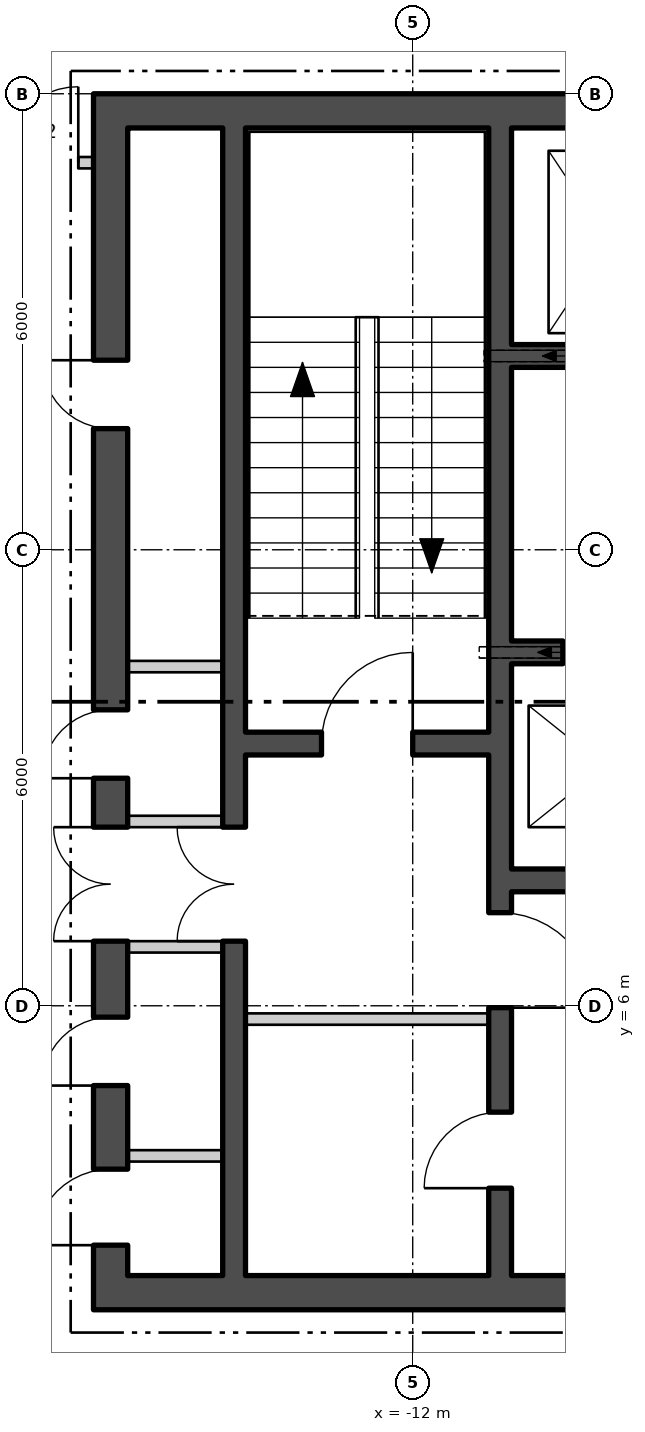
"""IFC4 building model, lengths in metres.
Left out: names, types, materials, properties, quantities, classifications, styles, units other than length and angle.
Written with IfcOpenShell. Run it as: python <this file> out.ifc"""

import sys

from ifc_helpers import new_model, si_unit, direction, frame, frame_2d, origin, place, context, subcontext, project, spatial, polyline, rectangle, outline, extrude, element, fill, save


model = new_model("IFC4")
c1 = context("Model", 3, precision=1e-05, world=origin(), true_north=direction((0.0, 1.0)))
c2 = subcontext(c1, "Body", "Model", "MODEL_VIEW")
j1 = project(units=[si_unit("LENGTHUNIT", "METRE"), si_unit("PLANEANGLEUNIT", "RADIAN")], contexts=[c1])
p1 = place(None, origin())
s1 = spatial("IfcSite", under=j1, at=p1, CompositionType="ELEMENT")
p2 = place(p1, origin())
s2 = spatial("IfcBuilding", under=s1, at=p2, CompositionType="ELEMENT")
p3 = place(p2, frame((0.0, 0.0, 192.6)))
s3 = spatial("IfcBuildingStorey", under=s2, at=p3, CompositionType="ELEMENT", Elevation=192.6)
p4 = place(p3, frame((-26.54, 13.618, -0.18), z_axis=(0.0, 0.0, 1.0), x_axis=(0.499999764979, -0.866025539474, 0.0)))
e1 = element("IfcWall", 1, at=p4, inside=s3, PredefinedType="SOLIDWALL", context=c2, shape_type="SweptSolid", body=[
    extrude(outline(polyline([(-0.13, -0.225), (45.87, -0.225), (45.61, 0.225), (0.13, 0.225), (-0.13, -0.225)])), origin(), (0.0, 0.0, 1.0), 3.68),
])
p5 = place(p4, frame((1.424, 0.0, 1.08)))
e2 = element("IfcOpeningElement", 2, at=p5, cuts=e1, PredefinedType="OPENING", context=c2, shape_type="SweptSolid", body=[
    extrude(rectangle(XDim=2.4, YDim=2.0, at=frame_2d((1.2, 1.0))), frame((0.0, 0.235, 0.0), z_axis=(0.0, -1.0, 0.0), x_axis=(1.0, 0.0, 0.0)), (0.0, 0.0, 1.0), 0.47),
])
p6 = place(p4, frame((5.893, 0.0, 1.08)))
e3 = element("IfcOpeningElement", 3, at=p6, cuts=e1, PredefinedType="OPENING", context=c2, shape_type="SweptSolid", body=[
    extrude(rectangle(XDim=2.4, YDim=2.0, at=frame_2d((1.2, 1.0))), frame((0.0, 0.235, 0.0), z_axis=(0.0, -1.0, 0.0), x_axis=(1.0, 0.0, 0.0)), (0.0, 0.0, 1.0), 0.47),
])
p7 = place(p4, frame((10.401, 0.0, 1.08)))
e4 = element("IfcOpeningElement", 4, at=p7, cuts=e1, PredefinedType="OPENING", context=c2, shape_type="SweptSolid", body=[
    extrude(rectangle(XDim=2.4, YDim=2.0, at=frame_2d((1.2, 1.0))), frame((0.0, 0.235, 0.0), z_axis=(0.0, -1.0, 0.0), x_axis=(1.0, 0.0, 0.0)), (0.0, 0.0, 1.0), 0.47),
])
p8 = place(p4, frame((14.909, 0.0, 1.08)))
e5 = element("IfcOpeningElement", 5, at=p8, cuts=e1, PredefinedType="OPENING", context=c2, shape_type="SweptSolid", body=[
    extrude(rectangle(XDim=2.4, YDim=2.0, at=frame_2d((1.2, 1.0))), frame((0.0, 0.235, 0.0), z_axis=(0.0, -1.0, 0.0), x_axis=(1.0, 0.0, 0.0)), (0.0, 0.0, 1.0), 0.47),
])
p9 = place(p4, frame((19.416, 0.0, 1.08)))
e6 = element("IfcOpeningElement", 6, at=p9, cuts=e1, PredefinedType="OPENING", context=c2, shape_type="SweptSolid", body=[
    extrude(rectangle(XDim=2.4, YDim=2.0, at=frame_2d((1.2, 1.0))), frame((0.0, 0.235, 0.0), z_axis=(0.0, -1.0, 0.0), x_axis=(1.0, 0.0, 0.0)), (0.0, 0.0, 1.0), 0.47),
])
p10 = place(p4, frame((23.924, 0.0, 1.08)))
e7 = element("IfcOpeningElement", 7, at=p10, cuts=e1, PredefinedType="OPENING", context=c2, shape_type="SweptSolid", body=[
    extrude(rectangle(XDim=2.4, YDim=2.0, at=frame_2d((1.2, 1.0))), frame((0.0, 0.235, 0.0), z_axis=(0.0, -1.0, 0.0), x_axis=(1.0, 0.0, 0.0)), (0.0, 0.0, 1.0), 0.47),
])
p11 = place(p4, frame((28.431, 0.0, 1.08)))
e8 = element("IfcOpeningElement", 8, at=p11, cuts=e1, PredefinedType="OPENING", context=c2, shape_type="SweptSolid", body=[
    extrude(rectangle(XDim=2.4, YDim=2.0, at=frame_2d((1.2, 1.0))), frame((0.0, 0.235, 0.0), z_axis=(0.0, -1.0, 0.0), x_axis=(1.0, 0.0, 0.0)), (0.0, 0.0, 1.0), 0.47),
])
p12 = place(p4, frame((32.939, 0.0, 1.08)))
e9 = element("IfcOpeningElement", 9, at=p12, cuts=e1, PredefinedType="OPENING", context=c2, shape_type="SweptSolid", body=[
    extrude(rectangle(XDim=2.4, YDim=2.0, at=frame_2d((1.2, 1.0))), frame((0.0, 0.235, 0.0), z_axis=(0.0, -1.0, 0.0), x_axis=(1.0, 0.0, 0.0)), (0.0, 0.0, 1.0), 0.47),
])
p13 = place(p4, frame((41.916, 0.0, 1.08)))
e10 = element("IfcOpeningElement", 10, at=p13, cuts=e1, PredefinedType="OPENING", context=c2, shape_type="SweptSolid", body=[
    extrude(rectangle(XDim=2.4, YDim=2.0, at=frame_2d((1.2, 1.0))), frame((0.0, 0.235, 0.0), z_axis=(0.0, -1.0, 0.0), x_axis=(1.0, 0.0, 0.0)), (0.0, 0.0, 1.0), 0.47),
])
p14 = place(p3, frame((-16.2, 2.225, 0.0), z_axis=(0.0, 0.0, 1.0), x_axis=(1.0, 0.0, 0.0)))
e11 = element("IfcWall", 11, at=p14, inside=s3, PredefinedType="SHEAR", context=c2, shape_type="SweptSolid", body=[
    extrude(rectangle(XDim=32.4, YDim=0.45, at=frame_2d((16.2, 0.0))), origin(), (0.0, 0.0, 1.0), 3.7),
])
p15 = place(p14, frame((10.7, 0.0, 0.0)))
e12 = element("IfcOpeningElement", 12, at=p15, cuts=e11, PredefinedType="OPENING", context=c2, shape_type="SweptSolid", body=[
    extrude(rectangle(XDim=1.8, YDim=2.4, at=frame_2d((0.9, 1.2))), frame((0.0, 0.235, 0.0), z_axis=(0.0, -1.0, 0.0), x_axis=(1.0, 0.0, 0.0)), (0.0, 0.0, 1.0), 0.47),
])
p16 = place(p14, frame((20.7, 0.0, 0.0)))
e13 = element("IfcOpeningElement", 13, at=p16, cuts=e11, PredefinedType="OPENING", context=c2, shape_type="SweptSolid", body=[
    extrude(rectangle(XDim=1.8, YDim=2.4, at=frame_2d((0.9, 1.2))), frame((0.0, 0.235, 0.0), z_axis=(0.0, -1.0, 0.0), x_axis=(1.0, 0.0, 0.0)), (0.0, 0.0, 1.0), 0.47),
])
p17 = place(p3, frame((-16.2, 17.775, 0.0), z_axis=(0.0, 0.0, 1.0), x_axis=(1.0, 0.0, 0.0)))
e14 = element("IfcWall", 14, at=p17, inside=s3, PredefinedType="SHEAR", context=c2, shape_type="SweptSolid", body=[
    extrude(rectangle(XDim=32.4, YDim=0.45, at=frame_2d((16.2, 0.0))), origin(), (0.0, 0.0, 1.0), 3.7),
])
p18 = place(p3, frame((-15.975, 2.45, 0.0), z_axis=(0.0, 0.0, 1.0), x_axis=(0.0, 1.0, 0.0)))
e15 = element("IfcWall", 15, at=p18, inside=s3, PredefinedType="SHEAR", context=c2, shape_type="SweptSolid", body=[
    extrude(rectangle(XDim=15.1, YDim=0.45, at=frame_2d((7.55, 0.0))), origin(), (0.0, 0.0, 1.0), 3.7),
])
p19 = place(p18, frame((4.4, 0.0, 0.0)))
e16 = element("IfcOpeningElement", 16, at=p19, cuts=e15, PredefinedType="OPENING", context=c2, shape_type="SweptSolid", body=[
    extrude(rectangle(XDim=1.5, YDim=2.1, at=frame_2d((0.75, 1.05))), frame((0.0, 0.235, 0.0), z_axis=(0.0, -1.0, 0.0), x_axis=(1.0, 0.0, 0.0)), (0.0, 0.0, 1.0), 0.47),
])
p20 = place(p18, frame((0.4, 0.0, 0.0)))
e17 = element("IfcOpeningElement", 17, at=p20, cuts=e15, PredefinedType="OPENING", context=c2, shape_type="SweptSolid", body=[
    extrude(rectangle(XDim=1.0, YDim=2.1, at=frame_2d((0.5, 1.05))), frame((0.0, 0.235, 0.0), z_axis=(0.0, -1.0, 0.0), x_axis=(1.0, 0.0, 0.0)), (0.0, 0.0, 1.0), 0.47),
])
p21 = place(p18, frame((2.5, 0.0, 0.0)))
e18 = element("IfcOpeningElement", 18, at=p21, cuts=e15, PredefinedType="OPENING", context=c2, shape_type="SweptSolid", body=[
    extrude(rectangle(XDim=0.9, YDim=2.1, at=frame_2d((0.45, 1.05))), frame((0.0, 0.235, 0.0), z_axis=(0.0, -1.0, 0.0), x_axis=(1.0, 0.0, 0.0)), (0.0, 0.0, 1.0), 0.47),
])
p22 = place(p18, frame((6.544, 0.0, 0.0)))
e19 = element("IfcOpeningElement", 19, at=p22, cuts=e15, PredefinedType="OPENING", context=c2, shape_type="SweptSolid", body=[
    extrude(rectangle(XDim=0.9, YDim=2.1, at=frame_2d((0.45, 1.05))), frame((0.0, 0.235, 0.0), z_axis=(0.0, -1.0, 0.0), x_axis=(1.0, 0.0, 0.0)), (0.0, 0.0, 1.0), 0.47),
])
p23 = place(p18, frame((11.144, 0.0, 0.0)))
e20 = element("IfcOpeningElement", 20, at=p23, cuts=e15, PredefinedType="OPENING", context=c2, shape_type="SweptSolid", body=[
    extrude(rectangle(XDim=0.9, YDim=2.1, at=frame_2d((0.45, 1.05))), frame((0.0, 0.235, 0.0), z_axis=(0.0, -1.0, 0.0), x_axis=(1.0, 0.0, 0.0)), (0.0, 0.0, 1.0), 0.47),
])
p24 = place(p3, frame((-10.85, 2.45, 0.0), z_axis=(0.0, 0.0, 1.0), x_axis=(0.0, 1.0, 0.0)))
e21 = element("IfcWall", 21, at=p24, inside=s3, PredefinedType="SHEAR", context=c2, shape_type="SweptSolid", body=[
    extrude(rectangle(XDim=15.1, YDim=0.3, at=frame_2d((7.55, 0.0))), origin(), (0.0, 0.0, 1.0), 3.7),
])
p25 = place(p24, frame((3.525, 0.0, 0.0)))
e22 = element("IfcOpeningElement", 22, at=p25, cuts=e21, PredefinedType="OPENING", context=c2, shape_type="SweptSolid", body=[
    extrude(rectangle(XDim=1.25, YDim=2.1, at=frame_2d((0.625, 1.05))), frame((0.0, 0.16, 0.0), z_axis=(0.0, -1.0, 0.0), x_axis=(1.0, 0.0, 0.0)), (0.0, 0.0, 1.0), 0.32),
])
p26 = place(p24, frame((1.15, 0.0, 0.0)))
e23 = element("IfcOpeningElement", 23, at=p26, cuts=e21, PredefinedType="OPENING", context=c2, shape_type="SweptSolid", body=[
    extrude(rectangle(XDim=1.0, YDim=2.1, at=frame_2d((0.5, 1.05))), frame((0.0, 0.16, 0.0), z_axis=(0.0, -1.0, 0.0), x_axis=(1.0, 0.0, 0.0)), (0.0, 0.0, 1.0), 0.32),
])
p27 = place(p3, frame((-14.35, 2.45, 0.0), z_axis=(0.0, 0.0, 1.0), x_axis=(0.0, 1.0, 0.0)))
e24 = element("IfcWall", 24, at=p27, inside=s3, PredefinedType="SHEAR", context=c2, shape_type="SweptSolid", body=[
    extrude(rectangle(XDim=15.1, YDim=0.3, at=frame_2d((7.55, 0.0))), origin(), (0.0, 0.0, 1.0), 3.7),
])
p28 = place(p27, frame((4.4, 0.0, 0.0)))
e25 = element("IfcOpeningElement", 25, at=p28, cuts=e24, PredefinedType="OPENING", context=c2, shape_type="SweptSolid", body=[
    extrude(rectangle(XDim=1.5, YDim=2.1, at=frame_2d((0.75, 1.05))), frame((0.0, 0.16, 0.0), z_axis=(0.0, -1.0, 0.0), x_axis=(1.0, 0.0, 0.0)), (0.0, 0.0, 1.0), 0.32),
])
p29 = place(p3, frame((-14.2, 9.45, 0.0), z_axis=(0.0, 0.0, 1.0), x_axis=(1.0, 0.0, 0.0)))
e26 = element("IfcWall", 26, at=p29, inside=s3, PredefinedType="SHEAR", context=c2, shape_type="SweptSolid", body=[
    extrude(rectangle(XDim=3.2, YDim=0.3, at=frame_2d((1.6, 0.0))), origin(), (0.0, 0.0, 1.0), 3.7),
])
p30 = place(p29, frame((1.0, 0.0, 0.0)))
e27 = element("IfcOpeningElement", 27, at=p30, cuts=e26, PredefinedType="OPENING", context=c2, shape_type="SweptSolid", body=[
    extrude(rectangle(XDim=1.2, YDim=2.1, at=frame_2d((0.6, 1.05))), frame((0.0, 0.16, 0.0), z_axis=(0.0, -1.0, 0.0), x_axis=(1.0, 0.0, 0.0)), (0.0, 0.0, 1.0), 0.32),
])
p31 = place(p3, frame((-10.7, 14.55, 0.0), z_axis=(0.0, 0.0, 1.0), x_axis=(1.0, 0.0, 0.0)))
e28 = element("IfcWall", 28, at=p31, inside=s3, PredefinedType="SHEAR", context=c2, shape_type="SweptSolid", body=[
    extrude(rectangle(XDim=21.4, YDim=0.3, at=frame_2d((10.7, 0.0))), origin(), (0.0, 0.0, 1.0), 3.7),
])
p32 = place(p31, frame((0.738, 0.0, 0.0)))
e29 = element("IfcOpeningElement", 29, at=p32, cuts=e28, PredefinedType="OPENING", context=c2, shape_type="SweptSolid", body=[
    extrude(rectangle(XDim=1.1, YDim=2.1, at=frame_2d((0.55, 1.05))), frame((0.0, 0.16, 0.0), z_axis=(0.0, -1.0, 0.0), x_axis=(1.0, 0.0, 0.0)), (0.0, 0.0, 1.0), 0.32),
])
p33 = place(p31, frame((3.462, 0.0, 0.0)))
e30 = element("IfcOpeningElement", 30, at=p33, cuts=e28, PredefinedType="OPENING", context=c2, shape_type="SweptSolid", body=[
    extrude(rectangle(XDim=1.1, YDim=2.1, at=frame_2d((0.55, 1.05))), frame((0.0, 0.16, 0.0), z_axis=(0.0, -1.0, 0.0), x_axis=(1.0, 0.0, 0.0)), (0.0, 0.0, 1.0), 0.32),
])
p34 = place(p31, frame((6.138, 0.0, 0.0)))
e31 = element("IfcOpeningElement", 31, at=p34, cuts=e28, PredefinedType="OPENING", context=c2, shape_type="SweptSolid", body=[
    extrude(rectangle(XDim=1.1, YDim=2.1, at=frame_2d((0.55, 1.05))), frame((0.0, 0.16, 0.0), z_axis=(0.0, -1.0, 0.0), x_axis=(1.0, 0.0, 0.0)), (0.0, 0.0, 1.0), 0.32),
])
p35 = place(p31, frame((8.812, 0.0, 0.0)))
e32 = element("IfcOpeningElement", 32, at=p35, cuts=e28, PredefinedType="OPENING", context=c2, shape_type="SweptSolid", body=[
    extrude(rectangle(XDim=1.1, YDim=2.1, at=frame_2d((0.55, 1.05))), frame((0.0, 0.16, 0.0), z_axis=(0.0, -1.0, 0.0), x_axis=(1.0, 0.0, 0.0)), (0.0, 0.0, 1.0), 0.32),
])
p36 = place(p31, frame((19.562, 0.0, 0.0)))
e33 = element("IfcOpeningElement", 33, at=p36, cuts=e28, PredefinedType="OPENING", context=c2, shape_type="SweptSolid", body=[
    extrude(rectangle(XDim=1.1, YDim=2.1, at=frame_2d((0.55, 1.05))), frame((0.0, 0.16, 0.0), z_axis=(0.0, -1.0, 0.0), x_axis=(1.0, 0.0, 0.0)), (0.0, 0.0, 1.0), 0.32),
])
p37 = place(p31, frame((11.537, 0.0, 0.0)))
e34 = element("IfcOpeningElement", 34, at=p37, cuts=e28, PredefinedType="OPENING", context=c2, shape_type="SweptSolid", body=[
    extrude(rectangle(XDim=1.0, YDim=2.1, at=frame_2d((0.5, 1.05))), frame((0.0, 0.16, 0.0), z_axis=(0.0, -1.0, 0.0), x_axis=(1.0, 0.0, 0.0)), (0.0, 0.0, 1.0), 0.32),
])
p38 = place(p31, frame((14.213, 0.0, 0.0)))
e35 = element("IfcOpeningElement", 35, at=p38, cuts=e28, PredefinedType="OPENING", context=c2, shape_type="SweptSolid", body=[
    extrude(rectangle(XDim=1.0, YDim=2.1, at=frame_2d((0.5, 1.05))), frame((0.0, 0.16, 0.0), z_axis=(0.0, -1.0, 0.0), x_axis=(1.0, 0.0, 0.0)), (0.0, 0.0, 1.0), 0.32),
])
p39 = place(p31, frame((16.887, 0.0, 0.0)))
e36 = element("IfcOpeningElement", 36, at=p39, cuts=e28, PredefinedType="OPENING", context=c2, shape_type="SweptSolid", body=[
    extrude(rectangle(XDim=1.0, YDim=2.1, at=frame_2d((0.5, 1.05))), frame((0.0, 0.16, 0.0), z_axis=(0.0, -1.0, 0.0), x_axis=(1.0, 0.0, 0.0)), (0.0, 0.0, 1.0), 0.32),
])
p40 = place(p3, frame((-10.7, 10.65, 0.0), z_axis=(0.0, 0.0, 1.0), x_axis=(1.0, 0.0, 0.0)))
e37 = element("IfcWall", 37, at=p40, inside=s3, PredefinedType="SHEAR", context=c2, shape_type="SweptSolid", body=[
    extrude(rectangle(XDim=10.3, YDim=0.3, at=frame_2d((5.15, 0.0))), origin(), (0.0, 0.0, 1.0), 3.7),
])
p41 = place(p40, frame((0.675, 0.0, 0.0)))
e38 = element("IfcOpeningElement", 38, at=p41, cuts=e37, PredefinedType="OPENING", context=c2, shape_type="SweptSolid", body=[
    extrude(rectangle(XDim=1.1, YDim=2.1, at=frame_2d((0.55, 1.05))), frame((0.0, 0.16, 0.0), z_axis=(0.0, -1.0, 0.0), x_axis=(1.0, 0.0, 0.0)), (0.0, 0.0, 1.0), 0.32),
])
p42 = place(p40, frame((3.275, 0.0, 0.0)))
e39 = element("IfcOpeningElement", 39, at=p42, cuts=e37, PredefinedType="OPENING", context=c2, shape_type="SweptSolid", body=[
    extrude(rectangle(XDim=1.1, YDim=2.1, at=frame_2d((0.55, 1.05))), frame((0.0, 0.16, 0.0), z_axis=(0.0, -1.0, 0.0), x_axis=(1.0, 0.0, 0.0)), (0.0, 0.0, 1.0), 0.32),
])
p43 = place(p40, frame((5.825, 0.0, 0.0)))
e40 = element("IfcOpeningElement", 40, at=p43, cuts=e37, PredefinedType="OPENING", context=c2, shape_type="SweptSolid", body=[
    extrude(rectangle(XDim=1.1, YDim=2.1, at=frame_2d((0.55, 1.05))), frame((0.0, 0.16, 0.0), z_axis=(0.0, -1.0, 0.0), x_axis=(1.0, 0.0, 0.0)), (0.0, 0.0, 1.0), 0.32),
])
p44 = place(p40, frame((8.425, 0.0, 0.0)))
e41 = element("IfcOpeningElement", 41, at=p44, cuts=e37, PredefinedType="OPENING", context=c2, shape_type="SweptSolid", body=[
    extrude(rectangle(XDim=1.0, YDim=2.1, at=frame_2d((0.5, 1.05))), frame((0.0, 0.16, 0.0), z_axis=(0.0, -1.0, 0.0), x_axis=(1.0, 0.0, 0.0)), (0.0, 0.0, 1.0), 0.32),
])
p45 = place(p3, frame((-10.7, 7.65, 0.0), z_axis=(0.0, 0.0, 1.0), x_axis=(1.0, 0.0, 0.0)))
e42 = element("IfcWall", 42, at=p45, inside=s3, PredefinedType="SHEAR", context=c2, shape_type="SweptSolid", body=[
    extrude(rectangle(XDim=10.3, YDim=0.3, at=frame_2d((5.15, 0.0))), origin(), (0.0, 0.0, 1.0), 3.7),
])
p46 = place(p3, frame((-14.2, 5.825, 0.0), z_axis=(0.0, 0.0, 1.0), x_axis=(1.0, 0.0, 0.0)))
e43 = element("IfcWall", 43, at=p46, inside=s3, PredefinedType="PARTITIONING", context=c2, shape_type="SweptSolid", body=[
    extrude(rectangle(XDim=3.2, YDim=0.15, at=frame_2d((1.6, 0.0))), origin(), (0.0, 0.0, 1.0), 3.7),
])
for number, where, z_axis, x_axis in (
    (44, (-15.75, 6.775, 0.0), (0.0, 0.0, 1.0), (1.0, 0.0, 0.0)),
    (45, (-15.75, 8.425, 0.0), (0.0, 0.0, 1.0), (1.0, 0.0, 0.0)),
    (46, (-15.75, 4.025, 0.0), (0.0, 0.0, 1.0), (1.0, 0.0, 0.0)),
    (47, (-15.75, 10.463, 0.0), (0.0, 0.0, 1.0), (1.0, 0.0, 0.0)),
):
    element("IfcWall", number, at=place(p3, frame(where, z_axis=z_axis, x_axis=x_axis)), inside=s3, PredefinedType="PARTITIONING", context=c2, shape_type="SweptSolid", body=[
        extrude(rectangle(XDim=1.25, YDim=0.15, at=frame_2d((0.625, 0.0))), origin(), (0.0, 0.0, 1.0), 3.7),
    ])
p47 = place(p3, frame((-17.956, 17.093, 0.0), z_axis=(0.0, 0.0, 1.0), x_axis=(1.0, 0.0, 0.0)))
e48 = element("IfcWall", 48, at=p47, inside=s3, PredefinedType="PARTITIONING", context=c2, shape_type="SweptSolid", body=[
    extrude(rectangle(XDim=1.756, YDim=0.15, at=frame_2d((0.878, 0.0))), origin(), (0.0, 0.0, 1.0), 3.7),
])
p48 = place(p47, frame((0.556, 0.0, 0.0)))
e49 = element("IfcOpeningElement", 49, at=p48, cuts=e48, PredefinedType="OPENING", context=c2, shape_type="SweptSolid", body=[
    extrude(rectangle(XDim=1.0, YDim=2.1, at=frame_2d((0.5, 1.05))), frame((0.0, 0.085, 0.0), z_axis=(0.0, -1.0, 0.0), x_axis=(1.0, 0.0, 0.0)), (0.0, 0.0, 1.0), 0.17),
])
p49 = place(p41, origin())
e50 = element("IfcDoor", 50, at=p49, inside=s3, OperationType="SLIDING_TO_LEFT", PredefinedType="DOOR", context=c2, shape_type="SweptSolid", body=[
    extrude(rectangle(XDim=1.1, YDim=2.1, at=frame_2d((0.55, 1.05))), frame((0.0, 0.025, 0.0), z_axis=(0.0, -1.0, 0.0), x_axis=(1.0, 0.0, 0.0)), (0.0, 0.0, 1.0), 0.05),
])
fill(e38, e50)
p50 = place(p30, origin())
e51 = element("IfcDoor", 51, at=p50, inside=s3, OperationType="SINGLE_SWING_LEFT", PredefinedType="DOOR", context=c2, shape_type="SweptSolid", body=[
    extrude(rectangle(XDim=1.2, YDim=2.1, at=frame_2d((0.6, 1.05))), frame((0.0, 0.025, 0.0), z_axis=(0.0, -1.0, 0.0), x_axis=(1.0, 0.0, 0.0)), (0.0, 0.0, 1.0), 0.05),
])
fill(e27, e51)
p51 = place(p25, origin())
e52 = element("IfcDoor", 52, at=p51, inside=s3, OperationType="SINGLE_SWING_LEFT", PredefinedType="DOOR", context=c2, shape_type="SweptSolid", body=[
    extrude(rectangle(XDim=1.25, YDim=2.1, at=frame_2d((0.625, 1.05))), frame((0.0, 0.025, 0.0), z_axis=(0.0, -1.0, 0.0), x_axis=(1.0, 0.0, 0.0)), (0.0, 0.0, 1.0), 0.05),
])
fill(e22, e52)
p52 = place(p26, origin())
e53 = element("IfcDoor", 53, at=p52, inside=s3, OperationType="SINGLE_SWING_RIGHT", PredefinedType="DOOR", context=c2, shape_type="SweptSolid", body=[
    extrude(rectangle(XDim=1.0, YDim=2.1, at=frame_2d((0.5, 1.05))), frame((0.0, 0.025, 0.0), z_axis=(0.0, -1.0, 0.0), x_axis=(1.0, 0.0, 0.0)), (0.0, 0.0, 1.0), 0.05),
])
fill(e23, e53)
p53 = place(p28, origin())
e54 = element("IfcDoor", 54, at=p53, inside=s3, OperationType="DOUBLE_DOOR_SINGLE_SWING", PredefinedType="DOOR", context=c2, shape_type="SweptSolid", body=[
    extrude(rectangle(XDim=1.5, YDim=2.1, at=frame_2d((0.75, 1.05))), frame((0.0, 0.025, 0.0), z_axis=(0.0, -1.0, 0.0), x_axis=(1.0, 0.0, 0.0)), (0.0, 0.0, 1.0), 0.05),
])
fill(e25, e54)
p54 = place(p19, origin())
e55 = element("IfcDoor", 55, at=p54, inside=s3, OperationType="DOUBLE_DOOR_SINGLE_SWING", PredefinedType="DOOR", context=c2, shape_type="SweptSolid", body=[
    extrude(rectangle(XDim=1.5, YDim=2.1, at=frame_2d((0.75, 1.05))), frame((0.0, 0.025, 0.0), z_axis=(0.0, -1.0, 0.0), x_axis=(1.0, 0.0, 0.0)), (0.0, 0.0, 1.0), 0.05),
])
fill(e16, e55)
p55 = place(p20, origin())
e56 = element("IfcDoor", 56, at=p55, inside=s3, OperationType="SINGLE_SWING_RIGHT", PredefinedType="DOOR", context=c2, shape_type="SweptSolid", body=[
    extrude(rectangle(XDim=1.0, YDim=2.1, at=frame_2d((0.5, 1.05))), frame((0.0, 0.025, 0.0), z_axis=(0.0, -1.0, 0.0), x_axis=(1.0, 0.0, 0.0)), (0.0, 0.0, 1.0), 0.05),
])
fill(e17, e56)
p56 = place(p21, origin())
e57 = element("IfcDoor", 57, at=p56, inside=s3, OperationType="SINGLE_SWING_RIGHT", PredefinedType="DOOR", context=c2, shape_type="SweptSolid", body=[
    extrude(rectangle(XDim=0.9, YDim=2.1, at=frame_2d((0.45, 1.05))), frame((0.0, 0.025, 0.0), z_axis=(0.0, -1.0, 0.0), x_axis=(1.0, 0.0, 0.0)), (0.0, 0.0, 1.0), 0.05),
])
fill(e18, e57)
p57 = place(p22, origin())
e58 = element("IfcDoor", 58, at=p57, inside=s3, OperationType="SINGLE_SWING_RIGHT", PredefinedType="DOOR", context=c2, shape_type="SweptSolid", body=[
    extrude(rectangle(XDim=0.9, YDim=2.1, at=frame_2d((0.45, 1.05))), frame((0.0, 0.025, 0.0), z_axis=(0.0, -1.0, 0.0), x_axis=(1.0, 0.0, 0.0)), (0.0, 0.0, 1.0), 0.05),
])
fill(e19, e58)
p58 = place(p23, origin())
e59 = element("IfcDoor", 59, at=p58, inside=s3, OperationType="SINGLE_SWING_LEFT", PredefinedType="DOOR", context=c2, shape_type="SweptSolid", body=[
    extrude(rectangle(XDim=0.9, YDim=2.1, at=frame_2d((0.45, 1.05))), frame((0.0, 0.025, 0.0), z_axis=(0.0, -1.0, 0.0), x_axis=(1.0, 0.0, 0.0)), (0.0, 0.0, 1.0), 0.05),
])
fill(e20, e59)
p59 = place(p48, origin())
e60 = element("IfcDoor", 60, at=p59, inside=s3, OperationType="SINGLE_SWING_LEFT", PredefinedType="DOOR", context=c2, shape_type="SweptSolid", body=[
    extrude(rectangle(XDim=1.0, YDim=2.1, at=frame_2d((0.5, 1.05))), frame((0.0, 0.025, 0.0), z_axis=(0.0, -1.0, 0.0), x_axis=(1.0, 0.0, 0.0)), (0.0, 0.0, 1.0), 0.05),
])
fill(e49, e60)
save(model, sys.argv[1])
